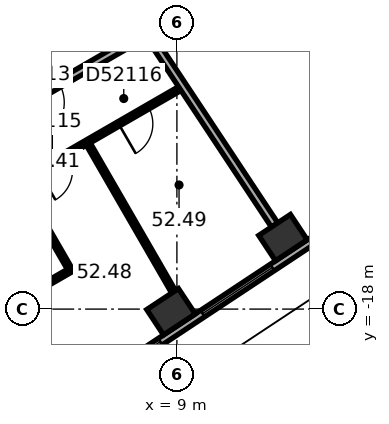
"""IFC4 building model, lengths in metres.
Left out: names, types, materials, properties, quantities, classifications, styles, units other than length and angle.
Written with IfcOpenShell. Run it as: python <this file> out.ifc"""

import sys

from ifc_helpers import new_model, si_unit, direction, frame, frame_2d, origin, origin_2d, place, context, subcontext, project, spatial, rectangle, extrude, element, fill, save


model = new_model("IFC4")
c1 = context("Model", 3, precision=1e-05, world=origin(), true_north=direction((0.0, 1.0)))
c2 = subcontext(c1, "Body", "Model", "MODEL_VIEW")
j1 = project(units=[si_unit("LENGTHUNIT", "METRE"), si_unit("PLANEANGLEUNIT", "RADIAN")], contexts=[c1])
p1 = place(None, origin())
s1 = spatial("IfcSite", under=j1, at=p1, CompositionType="ELEMENT")
p2 = place(p1, origin())
s2 = spatial("IfcBuilding", under=s1, at=p2, CompositionType="ELEMENT")
p3 = place(p2, frame((0.0, 0.0, 210.6)))
s3 = spatial("IfcBuildingStorey", under=s2, at=p3, CompositionType="ELEMENT", Elevation=210.6)
for number, where, z_axis, x_axis in (
    (1, (8.844, -18.07, 0.0), (0.0, 0.0, 1.0), (0.834, 0.552, 0.0)),
    (2, (11.791, -16.12, 0.0), (0.0, 0.0, 1.0), (0.834, 0.552, 0.0)),
):
    element("IfcColumn", number, at=place(p3, frame(where, z_axis=z_axis, x_axis=x_axis)), inside=s3, PredefinedType="COLUMN", context=c2, shape_type="SweptSolid", body=[
        extrude(rectangle(XDim=1.0, YDim=0.8, at=origin_2d()), origin(), (0.0, 0.0, 1.0), 3.7),
    ])
p4 = place(p3, frame((-0.2, -11.547, 0.0), z_axis=(0.0, 0.0, 1.0), x_axis=(0.866023897231, 0.500002609418, 0.0)))
e3 = element("IfcWall", 3, at=p4, inside=s3, PredefinedType="SHEAR", context=c2, shape_type="SweptSolid", body=[
    extrude(rectangle(XDim=11.894, YDim=0.8, at=frame_2d((5.947, 0.0))), origin(), (0.0, 0.0, 1.0), 3.7),
])
p5 = place(p4, frame((2.497, 0.0, 0.0)))
e4 = element("IfcOpeningElement", 4, at=p5, cuts=e3, PredefinedType="OPENING", context=c2, shape_type="SweptSolid", body=[
    extrude(rectangle(XDim=1.1, YDim=2.1, at=frame_2d((0.55, 1.05))), frame((0.0, 0.41, 0.0), z_axis=(0.0, -1.0, 0.0), x_axis=(1.0, 0.0, 0.0)), (0.0, 0.0, 1.0), 0.82),
])
p6 = place(p4, frame((5.097, 0.0, 0.0)))
e5 = element("IfcOpeningElement", 5, at=p6, cuts=e3, PredefinedType="OPENING", context=c2, shape_type="SweptSolid", body=[
    extrude(rectangle(XDim=1.1, YDim=2.1, at=frame_2d((0.55, 1.05))), frame((0.0, 0.41, 0.0), z_axis=(0.0, -1.0, 0.0), x_axis=(1.0, 0.0, 0.0)), (0.0, 0.0, 1.0), 0.82),
])
p7 = place(p4, frame((7.697, 0.0, 0.0)))
e6 = element("IfcOpeningElement", 6, at=p7, cuts=e3, PredefinedType="OPENING", context=c2, shape_type="SweptSolid", body=[
    extrude(rectangle(XDim=1.1, YDim=2.1, at=frame_2d((0.55, 1.05))), frame((0.0, 0.41, 0.0), z_axis=(0.0, -1.0, 0.0), x_axis=(1.0, 0.0, 0.0)), (0.0, 0.0, 1.0), 0.82),
])
p8 = place(p3, frame((2.739, -22.711, 0.0), z_axis=(0.0, 0.0, 1.0), x_axis=(0.833885723098, 0.551937134838, 0.0)))
e7 = element("IfcWall", 7, at=p8, inside=s3, PredefinedType="STANDARD", context=c2, shape_type="SweptSolid", body=[
    extrude(rectangle(XDim=18.841, YDim=0.2, at=frame_2d((9.421, 0.0))), origin(), (0.0, 0.0, 1.0), 3.7),
])
p9 = place(p8, frame((1.252, 0.0, 0.9)))
e8 = element("IfcOpeningElement", 8, at=p9, cuts=e7, PredefinedType="OPENING", context=c2, shape_type="SweptSolid", body=[
    extrude(rectangle(XDim=2.2, YDim=2.0, at=frame_2d((1.1, 1.0))), frame((0.0, 0.11, 0.0), z_axis=(0.0, -1.0, 0.0), x_axis=(1.0, 0.0, 0.0)), (0.0, 0.0, 1.0), 0.22),
])
p10 = place(p8, frame((4.786, 0.0, 0.9)))
e9 = element("IfcOpeningElement", 9, at=p10, cuts=e7, PredefinedType="OPENING", context=c2, shape_type="SweptSolid", body=[
    extrude(rectangle(XDim=2.2, YDim=2.0, at=frame_2d((1.1, 1.0))), frame((0.0, 0.11, 0.0), z_axis=(0.0, -1.0, 0.0), x_axis=(1.0, 0.0, 0.0)), (0.0, 0.0, 1.0), 0.22),
])
p11 = place(p8, frame((8.32, 0.0, 0.9)))
e10 = element("IfcOpeningElement", 10, at=p11, cuts=e7, PredefinedType="OPENING", context=c2, shape_type="SweptSolid", body=[
    extrude(rectangle(XDim=2.2, YDim=2.0, at=frame_2d((1.1, 1.0))), frame((0.0, 0.11, 0.0), z_axis=(0.0, -1.0, 0.0), x_axis=(1.0, 0.0, 0.0)), (0.0, 0.0, 1.0), 0.22),
])
p12 = place(p8, frame((11.854, 0.0, 0.9)))
e11 = element("IfcOpeningElement", 11, at=p12, cuts=e7, PredefinedType="OPENING", context=c2, shape_type="SweptSolid", body=[
    extrude(rectangle(XDim=2.2, YDim=2.0, at=frame_2d((1.1, 1.0))), frame((0.0, 0.11, 0.0), z_axis=(0.0, -1.0, 0.0), x_axis=(1.0, 0.0, 0.0)), (0.0, 0.0, 1.0), 0.22),
])
p13 = place(p8, frame((15.387, 0.0, 0.9)))
e12 = element("IfcOpeningElement", 12, at=p13, cuts=e7, PredefinedType="OPENING", context=c2, shape_type="SweptSolid", body=[
    extrude(rectangle(XDim=2.2, YDim=2.0, at=frame_2d((1.1, 1.0))), frame((0.0, 0.11, 0.0), z_axis=(0.0, -1.0, 0.0), x_axis=(1.0, 0.0, 0.0)), (0.0, 0.0, 1.0), 0.22),
])
p14 = place(p3, frame((2.716, -13.906, 0.0), z_axis=(0.0, 0.0, 1.0), x_axis=(0.866040290674, 0.499974214264, 0.0)))
e13 = element("IfcWall", 13, at=p14, inside=s3, PredefinedType="PARTITIONING", context=c2, shape_type="SweptSolid", body=[
    extrude(rectangle(XDim=8.702, YDim=0.2, at=frame_2d((4.351, 0.0))), origin(), (0.0, 0.0, 1.0), 3.35),
])
p15 = place(p14, frame((2.679, 0.0, 0.0)))
e14 = element("IfcOpeningElement", 14, at=p15, cuts=e13, PredefinedType="OPENING", context=c2, shape_type="SweptSolid", body=[
    extrude(rectangle(XDim=1.0, YDim=2.1, at=frame_2d((0.5, 1.05))), frame((0.0, 0.11, 0.0), z_axis=(0.0, -1.0, 0.0), x_axis=(1.0, 0.0, 0.0)), (0.0, 0.0, 1.0), 0.22),
])
p16 = place(p3, frame((3.117, -15.638, 0.0), z_axis=(0.0, 0.0, 1.0), x_axis=(0.866031365477, 0.499989673903, 0.0)))
e15 = element("IfcWall", 15, at=p16, inside=s3, PredefinedType="PARTITIONING", context=c2, shape_type="SweptSolid", body=[
    extrude(rectangle(XDim=6.881, YDim=0.12, at=frame_2d((3.44, 0.0))), origin(), (0.0, 0.0, 1.0), 3.35),
])
p17 = place(p16, frame((0.5, 0.0, 0.0)))
e16 = element("IfcOpeningElement", 16, at=p17, cuts=e15, PredefinedType="OPENING", context=c2, shape_type="SweptSolid", body=[
    extrude(rectangle(XDim=1.0, YDim=2.1, at=frame_2d((0.5, 1.05))), frame((0.0, 0.07, 0.0), z_axis=(0.0, -1.0, 0.0), x_axis=(1.0, 0.0, 0.0)), (0.0, 0.0, 1.0), 0.14),
])
p18 = place(p16, frame((2.583, 0.0, 0.0)))
e17 = element("IfcOpeningElement", 17, at=p18, cuts=e15, PredefinedType="OPENING", context=c2, shape_type="SweptSolid", body=[
    extrude(rectangle(XDim=0.9, YDim=2.1, at=frame_2d((0.45, 1.05))), frame((0.0, 0.07, 0.0), z_axis=(0.0, -1.0, 0.0), x_axis=(1.0, 0.0, 0.0)), (0.0, 0.0, 1.0), 0.14),
])
p19 = place(p16, frame((5.023, 0.0, 0.0)))
e18 = element("IfcOpeningElement", 18, at=p19, cuts=e15, PredefinedType="OPENING", context=c2, shape_type="SweptSolid", body=[
    extrude(rectangle(XDim=0.9, YDim=2.1, at=frame_2d((0.45, 1.05))), frame((0.0, 0.07, 0.0), z_axis=(0.0, -1.0, 0.0), x_axis=(1.0, 0.0, 0.0)), (0.0, 0.0, 1.0), 0.14),
])
p20 = place(p3, frame((4.61, -17.893, 0.0), z_axis=(0.0, 0.0, 1.0), x_axis=(0.866023842607, 0.500002704028, 0.0)))
e19 = element("IfcWall", 19, at=p20, inside=s3, PredefinedType="PARTITIONING", context=c2, shape_type="SweptSolid", body=[
    extrude(rectangle(XDim=1.835, YDim=0.12, at=frame_2d((0.917, 0.0))), origin(), (0.0, 0.0, 1.0), 3.35),
])
p21 = place(p3, frame((5.677, -19.687, 0.0), z_axis=(0.0, 0.0, 1.0), x_axis=(-0.551936619203, 0.833886064389, 0.0)))
e20 = element("IfcWall", 20, at=p21, inside=s3, PredefinedType="PARTITIONING", context=c2, shape_type="SweptSolid", body=[
    extrude(rectangle(XDim=7.592, YDim=0.2, at=frame_2d((3.796, 0.0))), origin(), (0.0, 0.0, 1.0), 3.35),
])
p22 = place(p3, frame((6.169, -16.924, 0.0), z_axis=(0.0, 0.0, 1.0), x_axis=(-0.500047388771, 0.865998042136, 0.0)))
e21 = element("IfcWall", 21, at=p22, inside=s3, PredefinedType="PARTITIONING", context=c2, shape_type="SweptSolid", body=[
    extrude(rectangle(XDim=2.58, YDim=0.12, at=frame_2d((1.29, 0.0))), origin(), (0.0, 0.0, 1.0), 3.35),
])
p23 = place(p3, frame((8.912, -17.545, 0.0), z_axis=(0.0, 0.0, 1.0), x_axis=(-0.500022113525, 0.866012636158, 0.0)))
e22 = element("IfcWall", 22, at=p23, inside=s3, PredefinedType="PARTITIONING", context=c2, shape_type="SweptSolid", body=[
    extrude(rectangle(XDim=4.49, YDim=0.12, at=frame_2d((2.245, 0.0))), origin(), (0.0, 0.0, 1.0), 2.65),
])
p24 = place(p3, frame((11.571, -15.786, 0.0), z_axis=(0.0, 0.0, 1.0), x_axis=(-0.551944861763, 0.833880608705, 0.0)))
e23 = element("IfcWall", 23, at=p24, inside=s3, PredefinedType="PARTITIONING", context=c2, shape_type="SweptSolid", body=[
    extrude(rectangle(XDim=5.957, YDim=0.2, at=frame_2d((2.979, 0.0))), origin(), (0.0, 0.0, 1.0), 3.35),
])
p25 = place(p10, origin())
e24 = element("IfcWindow", 24, at=p25, inside=s3, PartitioningType="SINGLE_PANEL", PredefinedType="WINDOW", context=c2, shape_type="SweptSolid", body=[
    extrude(rectangle(XDim=2.2, YDim=2.0, at=frame_2d((1.1, 1.0))), frame((0.0, 0.03, 0.0), z_axis=(0.0, -1.0, 0.0), x_axis=(1.0, 0.0, 0.0)), (0.0, 0.0, 1.0), 0.06),
])
fill(e9, e24)
p26 = place(p11, origin())
e25 = element("IfcWindow", 25, at=p26, inside=s3, PartitioningType="SINGLE_PANEL", PredefinedType="WINDOW", context=c2, shape_type="SweptSolid", body=[
    extrude(rectangle(XDim=2.2, YDim=2.0, at=frame_2d((1.1, 1.0))), frame((0.0, 0.03, 0.0), z_axis=(0.0, -1.0, 0.0), x_axis=(1.0, 0.0, 0.0)), (0.0, 0.0, 1.0), 0.06),
])
fill(e10, e25)
p27 = place(p15, origin())
e26 = element("IfcDoor", 26, at=p27, inside=s3, OperationType="SINGLE_SWING_LEFT", PredefinedType="DOOR", context=c2, shape_type="SweptSolid", body=[
    extrude(rectangle(XDim=1.0, YDim=2.1, at=frame_2d((0.5, 1.05))), frame((0.0, 0.025, 0.0), z_axis=(0.0, -1.0, 0.0), x_axis=(1.0, 0.0, 0.0)), (0.0, 0.0, 1.0), 0.05),
])
fill(e14, e26)
p28 = place(p18, origin())
e27 = element("IfcDoor", 27, at=p28, inside=s3, OperationType="SINGLE_SWING_LEFT", PredefinedType="DOOR", context=c2, shape_type="SweptSolid", body=[
    extrude(rectangle(XDim=0.9, YDim=2.1, at=frame_2d((0.45, 1.05))), frame((0.0, 0.025, 0.0), z_axis=(0.0, -1.0, 0.0), x_axis=(1.0, 0.0, 0.0)), (0.0, 0.0, 1.0), 0.05),
])
fill(e17, e27)
p29 = place(p19, origin())
e28 = element("IfcDoor", 28, at=p29, inside=s3, OperationType="SINGLE_SWING_LEFT", PredefinedType="DOOR", context=c2, shape_type="SweptSolid", body=[
    extrude(rectangle(XDim=0.9, YDim=2.1, at=frame_2d((0.45, 1.05))), frame((0.0, 0.025, 0.0), z_axis=(0.0, -1.0, 0.0), x_axis=(1.0, 0.0, 0.0)), (0.0, 0.0, 1.0), 0.05),
])
fill(e18, e28)
save(model, sys.argv[1])
